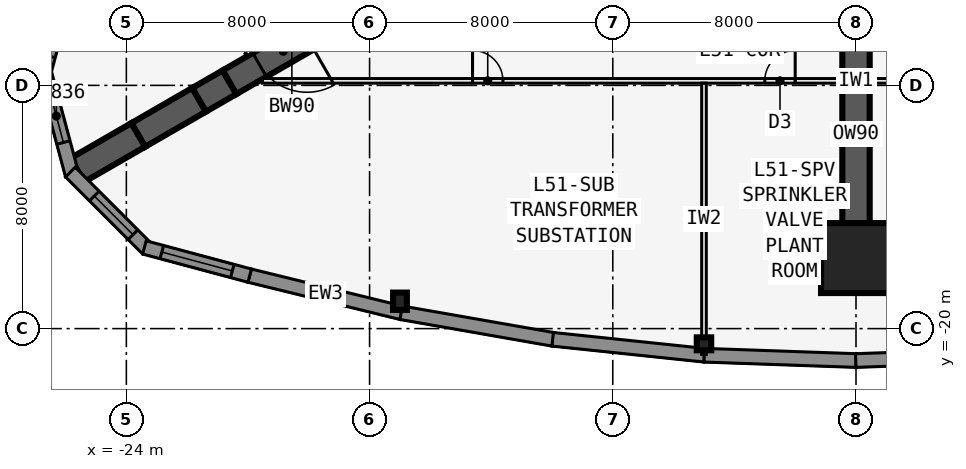
"""IFC4 building model, lengths in metres.
Left out: names, types, materials, properties, quantities, classifications, styles, units other than length and angle.
Written with IfcOpenShell. Run it as: python <this file> out.ifc"""

import sys

from ifc_helpers import new_model, si_unit, direction, frame, frame_2d, origin, origin_2d, place, context, subcontext, project, spatial, polyline, rectangle, i_section, outline, extrude, element, fill, save


model = new_model("IFC4")
c1 = context("Model", 3, precision=1e-05, world=origin(), true_north=direction((0.0, 1.0)))
c2 = subcontext(c1, "Body", "Model", "MODEL_VIEW")
j1 = project(units=[si_unit("LENGTHUNIT", "METRE"), si_unit("PLANEANGLEUNIT", "RADIAN")], contexts=[c1])
p1 = place(None, origin())
s1 = spatial("IfcSite", under=j1, at=p1, CompositionType="ELEMENT")
p2 = place(p1, origin())
s2 = spatial("IfcBuilding", under=s1, at=p2, CompositionType="ELEMENT")
p3 = place(p2, frame((0.0, 0.0, 189.5)))
s3 = spatial("IfcBuildingStorey", under=s2, at=p3, CompositionType="ELEMENT", Elevation=189.5)
p4 = place(p3, frame((-16.5, -9.526, 0.0), z_axis=(0.0, 0.0, 1.0), x_axis=(-0.866031398331, -0.499989616998, 0.0)))
e1 = element("IfcWall", 1, at=p4, inside=s3, PredefinedType="SHEAR", context=c2, shape_type="SweptSolid", body=[
    extrude(rectangle(XDim=4.746, YDim=0.9, at=frame_2d((2.373, 0.0))), origin(), (0.0, 0.0, 1.0), 6.4),
])
p5 = place(p4, frame((1.8, 0.0, 0.0)))
e2 = element("IfcOpeningElement", 2, at=p5, cuts=e1, PredefinedType="OPENING", context=c2, shape_type="SweptSolid", body=[
    extrude(rectangle(XDim=1.8, YDim=2.13, at=frame_2d((0.9, 1.065))), frame((0.0, 0.46, 0.0), z_axis=(0.0, -1.0, 0.0), x_axis=(1.0, 0.0, 0.0)), (0.0, 0.0, 1.0), 0.92),
])
p6 = place(p3, frame((-20.61, -11.899, 0.0), z_axis=(0.0, 0.0, 1.0), x_axis=(-0.866009537788, -0.500027479704, 0.0)))
e3 = element("IfcWall", 3, at=p6, inside=s3, PredefinedType="SHEAR", context=c2, shape_type="SweptSolid", body=[
    extrude(rectangle(XDim=1.155, YDim=0.9, at=frame_2d((0.577, 0.0))), origin(), (0.0, 0.0, 1.0), 6.4),
])
for number, where, z_axis, x_axis in (
    (4, (-21.61, -12.477, 0.0), (0.0, 0.0, 1.0), (-0.866, -0.5, 0.0)),
    (5, (-23.61, -13.631, 0.0), (0.0, 0.0, 1.0), (-0.866, -0.5, 0.0)),
):
    element("IfcWall", number, at=place(p3, frame(where, z_axis=z_axis, x_axis=x_axis)), inside=s3, PredefinedType="SHEAR", context=c2, shape_type="SweptSolid", body=[
        extrude(rectangle(XDim=2.309, YDim=0.9, at=frame_2d((1.155, 0.0))), origin(), (0.0, 0.0, 1.0), 6.4),
    ])
p7 = place(p3, frame((0.0, -9.526, 0.0), z_axis=(0.0, 0.0, 1.0), x_axis=(0.0, -1.0, 0.0)))
e6 = element("IfcWall", 6, at=p7, inside=s3, PredefinedType="SHEAR", context=c2, shape_type="SweptSolid", body=[
    extrude(rectangle(XDim=8.154, YDim=0.9, at=frame_2d((4.077, 0.0))), origin(), (0.0, 0.0, 1.0), 6.4),
])
p8 = place(p3, frame((-15.0, -19.1, 0.0), z_axis=(0.0, 0.0, 1.0), x_axis=(1.0, 0.0, 0.0)))
e7 = element("IfcColumn", 7, at=p8, inside=s3, PredefinedType="COLUMN", context=c2, shape_type="SweptSolid", body=[
    extrude(i_section(OverallWidth=0.455, OverallDepth=0.569, WebThickness=0.078, FlangeThickness=0.125, at=origin_2d()), origin(), (0.0, 0.0, 1.0), 6.4),
])
p9 = place(p3, frame((-5.0, -20.5, 0.0), z_axis=(0.0, 0.0, 1.0), x_axis=(0.0, -1.0, 0.0)))
e8 = element("IfcColumn", 8, at=p9, inside=s3, PredefinedType="COLUMN", context=c2, shape_type="SweptSolid", body=[
    extrude(i_section(OverallWidth=0.424, OverallDepth=0.475, WebThickness=0.048, FlangeThickness=0.077, at=origin_2d()), origin(), (0.0, 0.0, 1.0), 6.4),
])
p10 = place(p3, frame((0.0, -17.68, 0.0), z_axis=(0.0, 0.0, 1.0), x_axis=(0.0, -1.0, 0.0)))
e9 = element("IfcColumn", 9, at=p10, inside=s3, PredefinedType="COLUMN", context=c2, shape_type="SweptSolid", body=[
    extrude(rectangle(XDim=2.3, YDim=2.3, at=origin_2d()), origin(), (0.0, 0.0, 1.0), 6.4),
])
p11 = place(p3, frame((-19.947, -18.257, 0.0), z_axis=(0.0, 0.0, 1.0), x_axis=(0.971270024053, -0.237980126011, 0.0)))
e10 = element("IfcWall", 10, at=p11, inside=s3, PredefinedType="SOLIDWALL", context=c2, shape_type="SweptSolid", body=[
    extrude(outline(polyline([(0.0, 0.0), (5.148, 0.0), (5.148, 6.15), (0.0, 6.15), (0.0, 0.0)]), holes=[polyline([(4.524, 3.075), (4.458, 3.58), (4.263, 4.05), (3.953, 4.454), (3.549, 4.764), (3.079, 4.958), (2.574, 5.025), (2.069, 4.958), (1.599, 4.764), (1.195, 4.454), (0.885, 4.05), (0.69, 3.58), (0.624, 3.075), (0.69, 2.57), (0.885, 2.1), (1.195, 1.696), (1.599, 1.386), (2.069, 1.191), (2.574, 1.125), (3.079, 1.191), (3.549, 1.386), (3.953, 1.696), (4.263, 2.1), (4.458, 2.57), (4.524, 3.075)])]), frame((0.0, 0.225, 0.0), z_axis=(0.0, -1.0, 0.0), x_axis=(1.0, 0.0, 0.0)), (0.0, 0.0, 1.0), 0.45),
])
p12 = place(p3, frame((-14.961, -19.479, 0.0), z_axis=(0.0, 0.0, 1.0), x_axis=(0.985030467156, -0.172380331752, 0.0)))
e11 = element("IfcWall", 11, at=p12, inside=s3, PredefinedType="SOLIDWALL", context=c2, shape_type="SweptSolid", body=[
    extrude(outline(polyline([(0.0, 0.0), (5.076, 0.0), (5.076, 6.15), (0.0, 6.15), (0.0, 0.0)]), holes=[polyline([(4.438, 3.075), (4.373, 3.567), (4.183, 4.025), (3.882, 4.418), (3.488, 4.72), (3.03, 4.91), (2.538, 4.975), (2.046, 4.91), (1.588, 4.72), (1.195, 4.418), (0.893, 4.025), (0.703, 3.567), (0.638, 3.075), (0.703, 2.583), (0.893, 2.125), (1.195, 1.731), (1.588, 1.43), (2.046, 1.24), (2.538, 1.175), (3.03, 1.24), (3.488, 1.43), (3.882, 1.731), (4.183, 2.125), (4.373, 2.583), (4.438, 3.075)])]), frame((0.0, 0.225, 0.0), z_axis=(0.0, -1.0, 0.0), x_axis=(1.0, 0.0, 0.0)), (0.0, 0.0, 1.0), 0.45),
])
p13 = place(p3, frame((-9.977, -20.351, 0.0), z_axis=(0.0, 0.0, 1.0), x_axis=(0.994529640305, -0.104454748843, 0.0)))
e12 = element("IfcWall", 12, at=p13, inside=s3, PredefinedType="SOLIDWALL", context=c2, shape_type="SweptSolid", body=[
    extrude(outline(polyline([(0.0, 0.0), (5.028, 0.0), (5.028, 6.15), (0.0, 6.15), (0.0, 0.0)]), holes=[polyline([(4.414, 3.075), (4.349, 3.567), (4.159, 4.025), (3.857, 4.418), (3.464, 4.72), (3.006, 4.91), (2.514, 4.975), (2.022, 4.91), (1.564, 4.72), (1.17, 4.418), (0.868, 4.025), (0.678, 3.567), (0.614, 3.075), (0.678, 2.583), (0.868, 2.125), (1.17, 1.731), (1.564, 1.43), (2.022, 1.24), (2.514, 1.175), (3.006, 1.24), (3.464, 1.43), (3.857, 1.731), (4.159, 2.125), (4.349, 2.583), (4.414, 3.075)])]), frame((0.0, 0.225, 0.0), z_axis=(0.0, -1.0, 0.0), x_axis=(1.0, 0.0, 0.0)), (0.0, 0.0, 1.0), 0.45),
])
for number, where, z_axis, x_axis in (
    (13, (-4.992, -20.875, 0.0), (0.0, 0.0, 1.0), (0.999, -0.035, 0.0)),
    (14, (-0.008, -21.05, 0.0), (0.0, 0.0, 1.0), (0.999, 0.035, 0.0)),
):
    element("IfcWall", number, at=place(p3, frame(where, z_axis=z_axis, x_axis=x_axis)), inside=s3, PredefinedType="SOLIDWALL", context=c2, shape_type="SweptSolid", body=[
        extrude(outline(polyline([(0.0, 0.0), (5.003, 0.0), (5.003, 6.15), (0.0, 6.15), (0.0, 0.0)]), holes=[polyline([(4.402, 3.075), (4.337, 3.567), (4.147, 4.025), (3.845, 4.418), (3.451, 4.72), (2.993, 4.91), (2.501, 4.975), (2.01, 4.91), (1.552, 4.72), (1.158, 4.418), (0.856, 4.025), (0.666, 3.567), (0.602, 3.075), (0.666, 2.583), (0.856, 2.125), (1.158, 1.731), (1.552, 1.43), (2.01, 1.24), (2.501, 1.175), (2.993, 1.24), (3.451, 1.43), (3.845, 1.731), (4.147, 2.125), (4.337, 2.583), (4.402, 3.075)])]), frame((0.0, 0.225, 0.0), z_axis=(0.0, -1.0, 0.0), x_axis=(1.0, 0.0, 0.0)), (0.0, 0.0, 1.0), 0.45),
    ])
p14 = place(p3, frame((-25.783, -8.141, 0.0), z_axis=(0.0, 0.0, 1.0), x_axis=(-0.258823421857, -0.965924653531, 0.0)))
e15 = element("IfcWall", 15, at=p14, inside=s3, PredefinedType="SOLIDWALL", context=c2, shape_type="SweptSolid", body=[
    extrude(rectangle(XDim=3.586, YDim=0.45, at=frame_2d((1.793, 0.0))), origin(), (0.0, 0.0, 1.0), 6.15),
])
p15 = place(p14, frame((0.593, 0.0, 1.2)))
e16 = element("IfcOpeningElement", 16, at=p15, cuts=e15, PredefinedType="OPENING", context=c2, shape_type="SweptSolid", body=[
    extrude(rectangle(XDim=2.4, YDim=3.6, at=frame_2d((1.2, 1.8))), frame((0.0, 0.235, 0.0), z_axis=(0.0, -1.0, 0.0), x_axis=(1.0, 0.0, 0.0)), (0.0, 0.0, 1.0), 0.47),
])
p16 = place(p3, frame((-26.711, -11.489, 0.0), z_axis=(0.0, 0.0, 1.0), x_axis=(0.258823421857, -0.965924653531, 0.0)))
e17 = element("IfcWall", 17, at=p16, inside=s3, PredefinedType="SOLIDWALL", context=c2, shape_type="SweptSolid", body=[
    extrude(outline(polyline([(3.586, 0.225), (3.527, 0.225), (3.035, 0.093), (3.0, 0.225), (0.0, 0.225), (0.0, -0.225), (3.586, -0.225), (3.586, 0.225)])), origin(), (0.0, 0.0, 1.0), 6.15),
])
p17 = place(p16, frame((0.675, 0.0, 1.2)))
e18 = element("IfcOpeningElement", 18, at=p17, cuts=e17, PredefinedType="OPENING", context=c2, shape_type="SweptSolid", body=[
    extrude(rectangle(XDim=1.8, YDim=3.6, at=frame_2d((0.9, 1.8))), frame((0.0, 0.235, 0.0), z_axis=(0.0, -1.0, 0.0), x_axis=(1.0, 0.0, 0.0)), (0.0, 0.0, 1.0), 0.47),
])
p18 = place(p3, frame((-25.841, -14.852, 0.0), z_axis=(0.0, 0.0, 1.0), x_axis=(0.707106781187, -0.707106781187, 0.0)))
e19 = element("IfcWall", 19, at=p18, inside=s3, PredefinedType="SOLIDWALL", context=c2, shape_type="SweptSolid", body=[
    extrude(outline(polyline([(3.586, 0.225), (0.586, 0.225), (0.551, 0.093), (0.059, 0.225), (0.0, 0.225), (0.0, -0.225), (3.586, -0.225), (3.586, 0.225)])), origin(), (0.0, 0.0, 1.0), 6.15),
])
p19 = place(p18, frame((1.111, 0.0, 1.2)))
e20 = element("IfcOpeningElement", 20, at=p19, cuts=e19, PredefinedType="OPENING", context=c2, shape_type="SweptSolid", body=[
    extrude(rectangle(XDim=1.8, YDim=3.6, at=frame_2d((0.9, 1.8))), frame((0.0, 0.235, 0.0), z_axis=(0.0, -1.0, 0.0), x_axis=(1.0, 0.0, 0.0)), (0.0, 0.0, 1.0), 0.47),
])
p20 = place(p3, frame((-23.406, -17.33, 0.0), z_axis=(0.0, 0.0, 1.0), x_axis=(0.965924653531, -0.258823421857, 0.0)))
e21 = element("IfcWall", 21, at=p20, inside=s3, PredefinedType="SOLIDWALL", context=c2, shape_type="SweptSolid", body=[
    extrude(rectangle(XDim=3.586, YDim=0.45, at=frame_2d((1.793, 0.0))), origin(), (0.0, 0.0, 1.0), 6.15),
])
p21 = place(p20, frame((0.593, 0.0, 1.2)))
e22 = element("IfcOpeningElement", 22, at=p21, cuts=e21, PredefinedType="OPENING", context=c2, shape_type="SweptSolid", body=[
    extrude(rectangle(XDim=2.4, YDim=3.6, at=frame_2d((1.2, 1.8))), frame((0.0, 0.235, 0.0), z_axis=(0.0, -1.0, 0.0), x_axis=(1.0, 0.0, 0.0)), (0.0, 0.0, 1.0), 0.47),
])
p22 = place(p3, frame((-19.527, -11.851, 0.0), z_axis=(0.0, 0.0, 1.0), x_axis=(1.0, 0.0, 0.0)))
e23 = element("IfcWall", 23, at=p22, inside=s3, PredefinedType="PARTITIONING", context=c2, shape_type="SweptSolid", body=[
    extrude(rectangle(XDim=39.054, YDim=0.15, at=frame_2d((19.527, 0.0))), origin(), (0.0, 0.0, 1.0), 6.15),
])
p23 = place(p22, frame((6.914, 0.0, 0.0)))
e24 = element("IfcOpeningElement", 24, at=p23, cuts=e23, PredefinedType="OPENING", context=c2, shape_type="SweptSolid", body=[
    extrude(rectangle(XDim=1.0, YDim=2.13, at=frame_2d((0.5, 1.065))), frame((0.0, 0.085, 0.0), z_axis=(0.0, -1.0, 0.0), x_axis=(1.0, 0.0, 0.0)), (0.0, 0.0, 1.0), 0.17),
])
p24 = place(p22, frame((16.527, 0.0, 0.0)))
e25 = element("IfcOpeningElement", 25, at=p24, cuts=e23, PredefinedType="OPENING", context=c2, shape_type="SweptSolid", body=[
    extrude(rectangle(XDim=1.0, YDim=2.13, at=frame_2d((0.5, 1.065))), frame((0.0, 0.085, 0.0), z_axis=(0.0, -1.0, 0.0), x_axis=(1.0, 0.0, 0.0)), (0.0, 0.0, 1.0), 0.17),
])
p25 = place(p22, frame((28.64, 0.0, 0.0)))
e26 = element("IfcOpeningElement", 26, at=p25, cuts=e23, PredefinedType="OPENING", context=c2, shape_type="SweptSolid", body=[
    extrude(rectangle(XDim=1.0, YDim=2.13, at=frame_2d((0.5, 1.065))), frame((0.0, 0.085, 0.0), z_axis=(0.0, -1.0, 0.0), x_axis=(1.0, 0.0, 0.0)), (0.0, 0.0, 1.0), 0.17),
])
p26 = place(p3, frame((-5.0, -11.926, 0.0), z_axis=(0.0, 0.0, 1.0), x_axis=(0.0, -1.0, 0.0)))
e27 = element("IfcWall", 27, at=p26, inside=s3, PredefinedType="PARTITIONING", context=c2, shape_type="SweptSolid", body=[
    extrude(rectangle(XDim=8.923, YDim=0.15, at=frame_2d((4.461, 0.0))), origin(), (0.0, 0.0, 1.0), 4.75),
])
p27 = place(p3, frame((20.027, -10.985, 0.0), z_axis=(0.0, 0.0, 1.0), x_axis=(-0.500001677587, 0.866024435227, 0.0)))
e28 = element("IfcWall", 28, at=p27, inside=s3, PredefinedType="PARTITIONING", context=c2, shape_type="SweptSolid", body=[
    extrude(rectangle(XDim=39.054, YDim=0.15, at=frame_2d((19.527, 0.0))), origin(), (0.0, 0.0, 1.0), 6.15),
])
p28 = place(p27, frame((5.914, 0.0, 0.0)))
e29 = element("IfcOpeningElement", 29, at=p28, cuts=e28, PredefinedType="OPENING", context=c2, shape_type="SweptSolid", body=[
    extrude(rectangle(XDim=1.0, YDim=2.13, at=frame_2d((0.5, 1.065))), frame((0.0, 0.085, 0.0), z_axis=(0.0, -1.0, 0.0), x_axis=(1.0, 0.0, 0.0)), (0.0, 0.0, 1.0), 0.17),
])
p29 = place(p27, frame((15.527, 0.0, 0.0)))
e30 = element("IfcOpeningElement", 30, at=p29, cuts=e28, PredefinedType="OPENING", context=c2, shape_type="SweptSolid", body=[
    extrude(rectangle(XDim=1.0, YDim=2.13, at=frame_2d((0.5, 1.065))), frame((0.0, 0.085, 0.0), z_axis=(0.0, -1.0, 0.0), x_axis=(1.0, 0.0, 0.0)), (0.0, 0.0, 1.0), 0.17),
])
p30 = place(p27, frame((22.027, 0.0, 0.0)))
e31 = element("IfcOpeningElement", 31, at=p30, cuts=e28, PredefinedType="OPENING", context=c2, shape_type="SweptSolid", body=[
    extrude(rectangle(XDim=1.0, YDim=2.13, at=frame_2d((0.5, 1.065))), frame((0.0, 0.085, 0.0), z_axis=(0.0, -1.0, 0.0), x_axis=(1.0, 0.0, 0.0)), (0.0, 0.0, 1.0), 0.17),
])
p31 = place(p27, frame((31.64, 0.0, 0.0)))
e32 = element("IfcOpeningElement", 32, at=p31, cuts=e28, PredefinedType="OPENING", context=c2, shape_type="SweptSolid", body=[
    extrude(rectangle(XDim=1.0, YDim=2.13, at=frame_2d((0.5, 1.065))), frame((0.0, 0.085, 0.0), z_axis=(0.0, -1.0, 0.0), x_axis=(1.0, 0.0, 0.0)), (0.0, 0.0, 1.0), 0.17),
])
p32 = place(p3, frame((-0.5, 22.836, 0.0), z_axis=(0.0, 0.0, 1.0), x_axis=(-0.500001677587, -0.866024435227, 0.0)))
e33 = element("IfcWall", 33, at=p32, inside=s3, PredefinedType="PARTITIONING", context=c2, shape_type="SweptSolid", body=[
    extrude(rectangle(XDim=39.054, YDim=0.15, at=frame_2d((19.527, 0.0))), origin(), (0.0, 0.0, 1.0), 6.15),
])
p33 = place(p32, frame((7.914, 0.0, 0.0)))
e34 = element("IfcOpeningElement", 34, at=p33, cuts=e33, PredefinedType="OPENING", context=c2, shape_type="SweptSolid", body=[
    extrude(rectangle(XDim=1.0, YDim=2.13, at=frame_2d((0.5, 1.065))), frame((0.0, 0.085, 0.0), z_axis=(0.0, -1.0, 0.0), x_axis=(1.0, 0.0, 0.0)), (0.0, 0.0, 1.0), 0.17),
])
p34 = place(p32, frame((17.527, 0.0, 0.0)))
e35 = element("IfcOpeningElement", 35, at=p34, cuts=e33, PredefinedType="OPENING", context=c2, shape_type="SweptSolid", body=[
    extrude(rectangle(XDim=1.0, YDim=2.13, at=frame_2d((0.5, 1.065))), frame((0.0, 0.085, 0.0), z_axis=(0.0, -1.0, 0.0), x_axis=(1.0, 0.0, 0.0)), (0.0, 0.0, 1.0), 0.17),
])
p35 = place(p32, frame((28.64, 0.0, 0.0)))
e36 = element("IfcOpeningElement", 36, at=p35, cuts=e33, PredefinedType="OPENING", context=c2, shape_type="SweptSolid", body=[
    extrude(rectangle(XDim=1.0, YDim=2.13, at=frame_2d((0.5, 1.065))), frame((0.0, 0.085, 0.0), z_axis=(0.0, -1.0, 0.0), x_axis=(1.0, 0.0, 0.0)), (0.0, 0.0, 1.0), 0.17),
])
p36 = place(p15, origin())
e37 = element("IfcWindow", 37, at=p36, inside=s3, PartitioningType="SINGLE_PANEL", PredefinedType="WINDOW", context=c2, shape_type="SweptSolid", body=[
    extrude(rectangle(XDim=2.4, YDim=3.6, at=frame_2d((1.2, 1.8))), frame((0.0, 0.03, 0.0), z_axis=(0.0, -1.0, 0.0), x_axis=(1.0, 0.0, 0.0)), (0.0, 0.0, 1.0), 0.06),
])
fill(e16, e37)
p37 = place(p17, origin())
e38 = element("IfcWindow", 38, at=p37, inside=s3, PartitioningType="SINGLE_PANEL", PredefinedType="WINDOW", context=c2, shape_type="SweptSolid", body=[
    extrude(rectangle(XDim=1.8, YDim=3.6, at=frame_2d((0.9, 1.8))), frame((0.0, 0.03, 0.0), z_axis=(0.0, -1.0, 0.0), x_axis=(1.0, 0.0, 0.0)), (0.0, 0.0, 1.0), 0.06),
])
fill(e18, e38)
p38 = place(p19, origin())
e39 = element("IfcWindow", 39, at=p38, inside=s3, PartitioningType="SINGLE_PANEL", PredefinedType="WINDOW", context=c2, shape_type="SweptSolid", body=[
    extrude(rectangle(XDim=1.8, YDim=3.6, at=frame_2d((0.9, 1.8))), frame((0.0, 0.03, 0.0), z_axis=(0.0, -1.0, 0.0), x_axis=(1.0, 0.0, 0.0)), (0.0, 0.0, 1.0), 0.06),
])
fill(e20, e39)
p39 = place(p21, origin())
e40 = element("IfcWindow", 40, at=p39, inside=s3, PartitioningType="SINGLE_PANEL", PredefinedType="WINDOW", context=c2, shape_type="SweptSolid", body=[
    extrude(rectangle(XDim=2.4, YDim=3.6, at=frame_2d((1.2, 1.8))), frame((0.0, 0.03, 0.0), z_axis=(0.0, -1.0, 0.0), x_axis=(1.0, 0.0, 0.0)), (0.0, 0.0, 1.0), 0.06),
])
fill(e22, e40)
p40 = place(p23, origin())
e41 = element("IfcDoor", 41, at=p40, inside=s3, OperationType="SINGLE_SWING_LEFT", PredefinedType="DOOR", context=c2, shape_type="SweptSolid", body=[
    extrude(rectangle(XDim=1.0, YDim=2.13, at=frame_2d((0.5, 1.065))), frame((0.0, 0.025, 0.0), z_axis=(0.0, -1.0, 0.0), x_axis=(1.0, 0.0, 0.0)), (0.0, 0.0, 1.0), 0.05),
])
fill(e24, e41)
p41 = place(p24, origin())
e42 = element("IfcDoor", 42, at=p41, inside=s3, OperationType="SINGLE_SWING_RIGHT", PredefinedType="DOOR", context=c2, shape_type="SweptSolid", body=[
    extrude(rectangle(XDim=1.0, YDim=2.13, at=frame_2d((0.5, 1.065))), frame((0.0, 0.025, 0.0), z_axis=(0.0, -1.0, 0.0), x_axis=(1.0, 0.0, 0.0)), (0.0, 0.0, 1.0), 0.05),
])
fill(e25, e42)
p42 = place(p5, origin())
e43 = element("IfcDoor", 43, at=p42, inside=s3, OperationType="DOUBLE_DOOR_DOUBLE_SWING", PredefinedType="DOOR", context=c2, shape_type="SweptSolid", body=[
    extrude(rectangle(XDim=1.8, YDim=2.13, at=frame_2d((0.9, 1.065))), frame((0.0, 0.025, 0.0), z_axis=(0.0, -1.0, 0.0), x_axis=(1.0, 0.0, 0.0)), (0.0, 0.0, 1.0), 0.05),
])
fill(e2, e43)
save(model, sys.argv[1])
